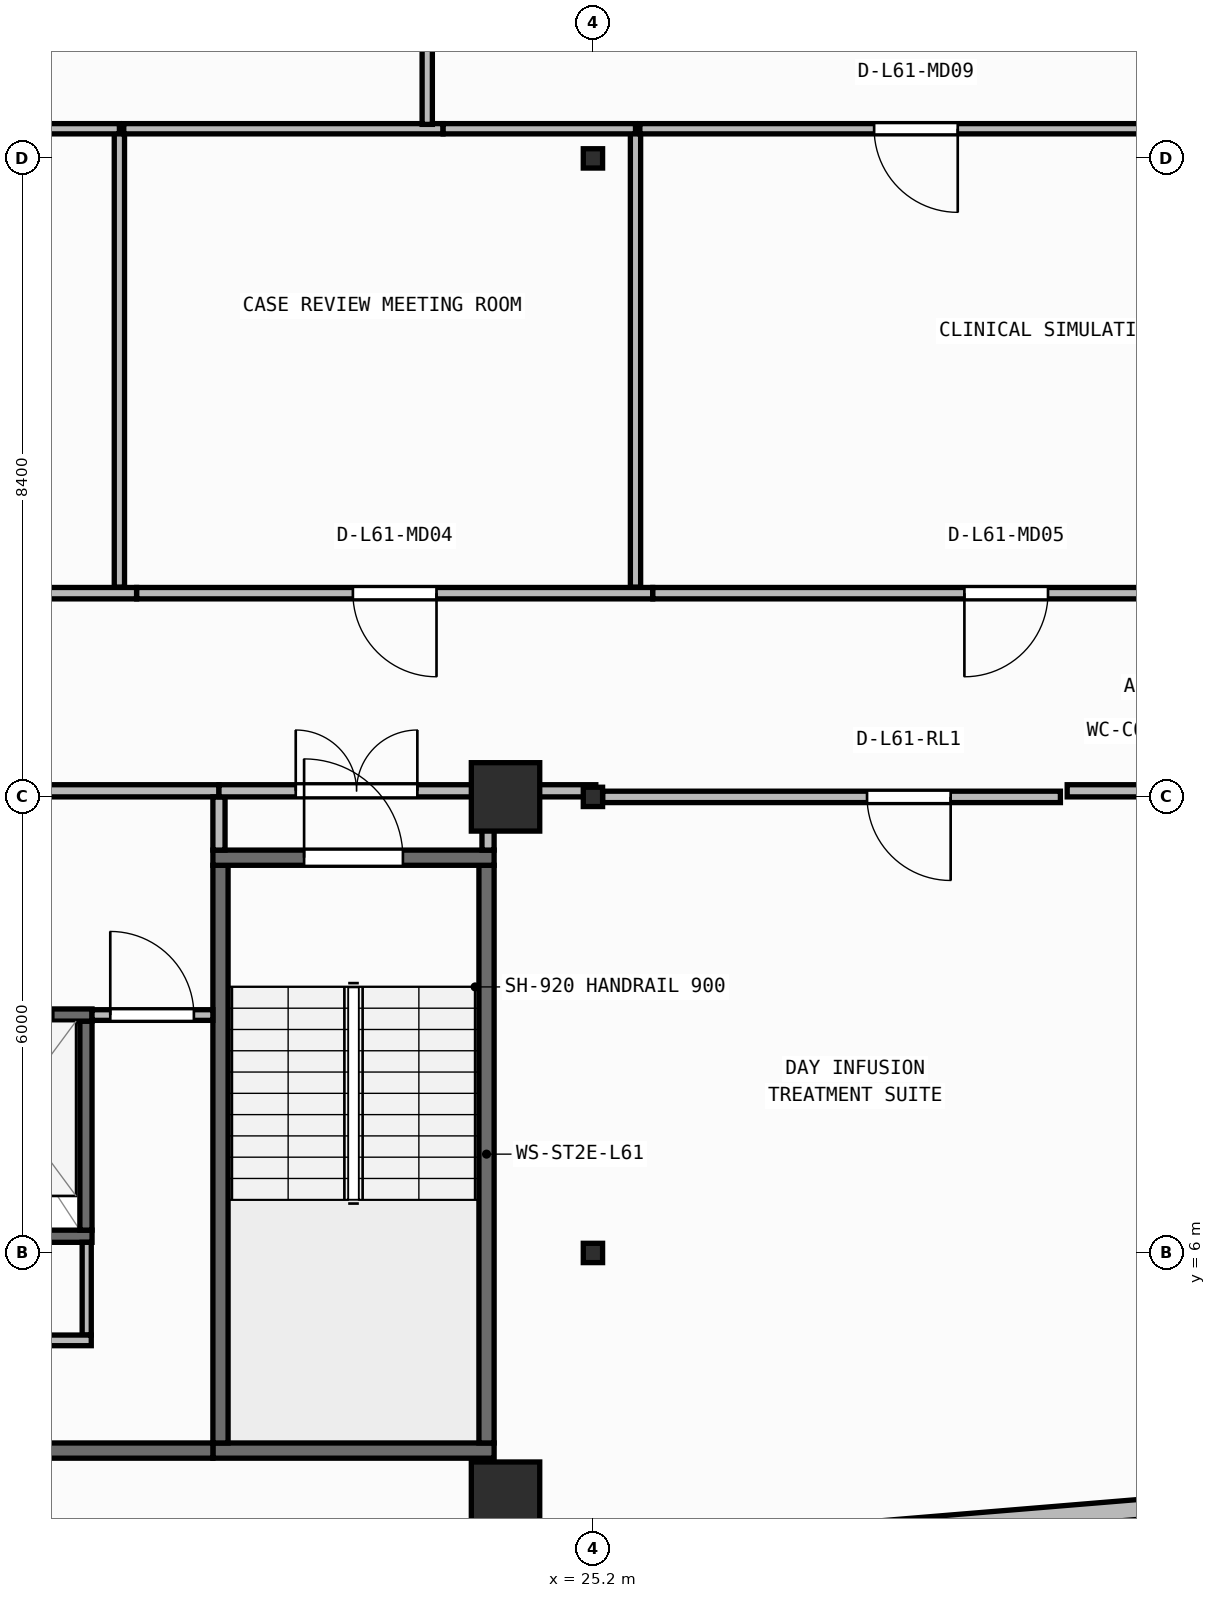
"""IFC4 building model, lengths in metres.
Left out: names, types, materials, properties, quantities, classifications, styles, units other than length and angle.
Written with IfcOpenShell. Run it as: python <this file> out.ifc"""

import sys

from ifc_helpers import new_model, si_unit, direction, frame, frame_2d, origin, origin_2d, place, context, subcontext, project, spatial, rectangle, i_section, extrude, element, fill, save


model = new_model("IFC4")
c1 = context("Model", 3, precision=1e-05, world=origin(), true_north=direction((0.0, 1.0)))
c2 = subcontext(c1, "Body", "Model", "MODEL_VIEW")
j1 = project(units=[si_unit("LENGTHUNIT", "METRE"), si_unit("PLANEANGLEUNIT", "RADIAN")], contexts=[c1])
p1 = place(None, origin())
s1 = spatial("IfcSite", under=j1, at=p1, CompositionType="ELEMENT")
p2 = place(p1, origin())
s2 = spatial("IfcBuilding", under=s1, at=p2, CompositionType="ELEMENT")
p3 = place(p2, frame((0.0, 0.0, 248.65)))
s3 = spatial("IfcBuildingStorey", under=s2, at=p3, CompositionType="ELEMENT", Elevation=248.65)
p4 = place(p3, frame((24.05, 2.8, 0.0), z_axis=(0.0, 0.0, 1.0), x_axis=(1.0, 0.0, 0.0)))
e1 = element("IfcColumn", 1, at=p4, inside=s3, PredefinedType="COLUMN", context=c2, shape_type="SweptSolid", body=[
    extrude(rectangle(XDim=0.9, YDim=0.9, at=origin_2d()), origin(), (0.0, 0.0, 1.0), 3.95),
])
p5 = place(p3, frame((25.2, 6.0, 0.0), z_axis=(0.0, 0.0, 1.0), x_axis=(1.0, 0.0, 0.0)))
e2 = element("IfcColumn", 2, at=p5, inside=s3, PredefinedType="COLUMN", context=c2, shape_type="SweptSolid", body=[
    extrude(i_section(OverallWidth=0.254, OverallDepth=0.254, WebThickness=0.009, FlangeThickness=0.014, FilletRadius=0.013, at=origin_2d()), origin(), (0.0, 0.0, 1.0), 3.95),
])
p6 = place(p3, frame((24.05, 12.0, 0.0), z_axis=(0.0, 0.0, 1.0), x_axis=(1.0, 0.0, 0.0)))
e3 = element("IfcColumn", 3, at=p6, inside=s3, PredefinedType="COLUMN", context=c2, shape_type="SweptSolid", body=[
    extrude(rectangle(XDim=0.9, YDim=0.9, at=origin_2d()), origin(), (0.0, 0.0, 1.0), 3.95),
])
for number, where, z_axis, x_axis in (
    (4, (25.2, 12.0, 0.0), (0.0, 0.0, 1.0), (1.0, 0.0, 0.0)),
    (5, (25.2, 20.4, 0.0), (0.0, 0.0, 1.0), (1.0, 0.0, 0.0)),
):
    element("IfcColumn", number, at=place(p3, frame(where, z_axis=z_axis, x_axis=x_axis)), inside=s3, PredefinedType="COLUMN", context=c2, shape_type="SweptSolid", body=[
        extrude(i_section(OverallWidth=0.254, OverallDepth=0.254, WebThickness=0.009, FlangeThickness=0.014, FilletRadius=0.013, at=origin_2d()), origin(), (0.0, 0.0, 1.0), 3.95),
    ])
p7 = place(p3, frame((2.66, 0.174, 0.0), z_axis=(0.0, 0.0, 1.0), x_axis=(0.996611813627, 0.082248969229, 0.0)))
e6 = element("IfcWall", 6, at=p7, inside=s3, PredefinedType="STANDARD", context=c2, shape_type="SweptSolid", body=[
    extrude(rectangle(XDim=41.019, YDim=0.26, at=frame_2d((20.51, 0.0))), origin(), (0.0, 0.0, 1.0), 3.71),
])
p8 = place(p7, frame((19.31, 0.0, 0.9)))
e7 = element("IfcOpeningElement", 7, at=p8, cuts=e6, PredefinedType="OPENING", context=c2, shape_type="SweptSolid", body=[
    extrude(rectangle(XDim=2.4, YDim=1.65, at=frame_2d((1.2, 0.825))), frame((0.0, 0.14, 0.0), z_axis=(0.0, -1.0, 0.0), x_axis=(1.0, 0.0, 0.0)), (0.0, 0.0, 1.0), 0.28),
])
p9 = place(p3, frame((20.2, 3.4, 0.0), z_axis=(0.0, 0.0, 1.0), x_axis=(1.0, 0.0, 0.0)))
e8 = element("IfcWall", 8, at=p9, inside=s3, PredefinedType="SHEAR", context=c2, shape_type="SweptSolid", body=[
    extrude(rectangle(XDim=3.7, YDim=0.2, at=frame_2d((1.85, 0.0))), origin(), (0.0, 0.0, 1.0), 3.71),
])
for number, where, z_axis, x_axis in (
    (9, (20.3, 3.5, 0.0), (0.0, 0.0, 1.0), (0.0, 1.0, 0.0)),
    (10, (23.8, 3.5, 0.0), (0.0, 0.0, 1.0), (0.0, 1.0, 0.0)),
):
    element("IfcWall", number, at=place(p3, frame(where, z_axis=z_axis, x_axis=x_axis)), inside=s3, PredefinedType="SHEAR", context=c2, shape_type="SweptSolid", body=[
        extrude(rectangle(XDim=7.6, YDim=0.2, at=frame_2d((3.8, 0.0))), origin(), (0.0, 0.0, 1.0), 3.71),
    ])
p10 = place(p3, frame((20.2, 11.2, 0.0), z_axis=(0.0, 0.0, 1.0), x_axis=(1.0, 0.0, 0.0)))
e11 = element("IfcWall", 11, at=p10, inside=s3, PredefinedType="SHEAR", context=c2, shape_type="SweptSolid", body=[
    extrude(rectangle(XDim=3.7, YDim=0.2, at=frame_2d((1.85, 0.0))), origin(), (0.0, 0.0, 1.0), 3.71),
])
p11 = place(p10, frame((1.2, 0.0, 0.0)))
e12 = element("IfcOpeningElement", 12, at=p11, cuts=e11, PredefinedType="OPENING", context=c2, shape_type="SweptSolid", body=[
    extrude(rectangle(XDim=1.3, YDim=2.15, at=frame_2d((0.65, 1.075))), frame((0.0, 0.11, 0.0), z_axis=(0.0, -1.0, 0.0), x_axis=(1.0, 0.0, 0.0)), (0.0, 0.0, 1.0), 0.22),
])
p12 = place(p3, frame((6.5, 3.4, 0.0), z_axis=(0.0, 0.0, 1.0), x_axis=(1.0, 0.0, 0.0)))
e13 = element("IfcWall", 13, at=p12, inside=s3, PredefinedType="SHEAR", context=c2, shape_type="SweptSolid", body=[
    extrude(rectangle(XDim=13.7, YDim=0.2, at=frame_2d((6.85, 0.0))), origin(), (0.0, 0.0, 1.0), 3.71),
])
p13 = place(p3, frame((6.5, 6.22, 0.0), z_axis=(0.0, 0.0, 1.0), x_axis=(1.0, 0.0, 0.0)))
e14 = element("IfcWall", 14, at=p13, inside=s3, PredefinedType="SHEAR", context=c2, shape_type="SweptSolid", body=[
    extrude(rectangle(XDim=12.11, YDim=0.16, at=frame_2d((6.055, 0.0))), origin(), (0.0, 0.0, 1.0), 3.71),
])
p14 = place(p3, frame((18.53, 6.3, 0.0), z_axis=(0.0, 0.0, 1.0), x_axis=(0.0, 1.0, 0.0)))
e15 = element("IfcWall", 15, at=p14, inside=s3, PredefinedType="SHEAR", context=c2, shape_type="SweptSolid", body=[
    extrude(rectangle(XDim=2.75, YDim=0.16, at=frame_2d((1.375, 0.0))), origin(), (0.0, 0.0, 1.0), 3.71),
])
p15 = place(p3, frame((16.575, 9.13, 0.0), z_axis=(0.0, 0.0, 1.0), x_axis=(1.0, 0.0, 0.0)))
e16 = element("IfcWall", 16, at=p15, inside=s3, PredefinedType="SHEAR", context=c2, shape_type="SweptSolid", body=[
    extrude(rectangle(XDim=2.035, YDim=0.16, at=frame_2d((1.018, 0.0))), origin(), (0.0, 0.0, 1.0), 3.71),
])
p16 = place(p15, frame((0.425, 0.0, 0.0)))
e17 = element("IfcOpeningElement", 17, at=p16, cuts=e16, PredefinedType="OPENING", context=c2, shape_type="SweptSolid", body=[
    extrude(rectangle(XDim=1.1, YDim=2.15, at=frame_2d((0.55, 1.075))), frame((0.0, 0.09, 0.0), z_axis=(0.0, -1.0, 0.0), x_axis=(1.0, 0.0, 0.0)), (0.0, 0.0, 1.0), 0.18),
])
p17 = place(p3, frame((18.54, 4.92, 0.0), z_axis=(0.0, 0.0, 1.0), x_axis=(0.0, 1.0, 0.0)))
e18 = element("IfcWall", 18, at=p17, inside=s3, PredefinedType="PARTITIONING", context=c2, shape_type="SweptSolid", body=[
    extrude(rectangle(XDim=1.22, YDim=0.12, at=frame_2d((0.61, 0.0))), origin(), (0.0, 0.0, 1.0), 3.71),
])
p18 = place(p3, frame((6.5, 4.85, 0.0), z_axis=(0.0, 0.0, 1.0), x_axis=(1.0, 0.0, 0.0)))
e19 = element("IfcWall", 19, at=p18, inside=s3, PredefinedType="PARTITIONING", context=c2, shape_type="SweptSolid", body=[
    extrude(rectangle(XDim=12.1, YDim=0.14, at=frame_2d((6.05, 0.0))), origin(), (0.0, 0.0, 1.0), 3.71),
])
p19 = place(p18, frame((5.5, 0.0, 0.0)))
e20 = element("IfcOpeningElement", 20, at=p19, cuts=e19, PredefinedType="OPENING", context=c2, shape_type="SweptSolid", body=[
    extrude(rectangle(XDim=1.1, YDim=2.1, at=frame_2d((0.55, 1.05))), frame((0.0, 0.08, 0.0), z_axis=(0.0, -1.0, 0.0), x_axis=(1.0, 0.0, 0.0)), (0.0, 0.0, 1.0), 0.16),
])
p20 = place(p3, frame((18.61, 9.13, 0.0), z_axis=(0.0, 0.0, 1.0), x_axis=(1.0, 0.0, 0.0)))
e21 = element("IfcWall", 21, at=p20, inside=s3, PredefinedType="PARTITIONING", context=c2, shape_type="SweptSolid", body=[
    extrude(rectangle(XDim=1.59, YDim=0.14, at=frame_2d((0.795, 0.0))), origin(), (0.0, 0.0, 1.0), 3.71),
])
p21 = place(p20, frame((0.24, 0.0, 0.0)))
e22 = element("IfcOpeningElement", 22, at=p21, cuts=e21, PredefinedType="OPENING", context=c2, shape_type="SweptSolid", body=[
    extrude(rectangle(XDim=1.1, YDim=2.1, at=frame_2d((0.55, 1.05))), frame((0.0, 0.08, 0.0), z_axis=(0.0, -1.0, 0.0), x_axis=(1.0, 0.0, 0.0)), (0.0, 0.0, 1.0), 0.16),
])
p22 = place(p3, frame((12.58, 12.08, 0.0), z_axis=(0.0, 0.0, 1.0), x_axis=(1.0, 0.0, 0.0)))
e23 = element("IfcWall", 23, at=p22, inside=s3, PredefinedType="PARTITIONING", context=c2, shape_type="SweptSolid", body=[
    extrude(rectangle(XDim=7.7, YDim=0.16, at=frame_2d((3.85, 0.0))), origin(), (0.0, 0.0, 1.0), 3.157),
])
p23 = place(p22, frame((3.05, 0.0, 0.0)))
e24 = element("IfcOpeningElement", 24, at=p23, cuts=e23, PredefinedType="OPENING", context=c2, shape_type="SweptSolid", body=[
    extrude(rectangle(XDim=1.6, YDim=2.05, at=frame_2d((0.8, 1.025))), frame((0.0, 0.09, 0.0), z_axis=(0.0, -1.0, 0.0), x_axis=(1.0, 0.0, 0.0)), (0.0, 0.0, 1.0), 0.18),
])
p24 = place(p3, frame((20.28, 11.3, 0.0), z_axis=(0.0, 0.0, 1.0), x_axis=(0.0, 1.0, 0.0)))
e25 = element("IfcWall", 25, at=p24, inside=s3, PredefinedType="PARTITIONING", context=c2, shape_type="SweptSolid", body=[
    extrude(rectangle(XDim=0.7, YDim=0.16, at=frame_2d((0.35, 0.0))), origin(), (0.0, 0.0, 1.0), 3.71),
])
p25 = place(p3, frame((20.28, 12.08, 0.0), z_axis=(0.0, 0.0, 1.0), x_axis=(1.0, 0.0, 0.0)))
e26 = element("IfcWall", 26, at=p25, inside=s3, PredefinedType="PARTITIONING", context=c2, shape_type="SweptSolid", body=[
    extrude(rectangle(XDim=3.62, YDim=0.16, at=frame_2d((1.81, 0.0))), origin(), (0.0, 0.0, 1.0), 3.157),
])
p26 = place(p25, frame((1.01, 0.0, 0.0)))
e27 = element("IfcOpeningElement", 27, at=p26, cuts=e26, PredefinedType="OPENING", context=c2, shape_type="SweptSolid", body=[
    extrude(rectangle(XDim=1.6, YDim=2.05, at=frame_2d((0.8, 1.025))), frame((0.0, 0.09, 0.0), z_axis=(0.0, -1.0, 0.0), x_axis=(1.0, 0.0, 0.0)), (0.0, 0.0, 1.0), 0.18),
])
p27 = place(p3, frame((23.82, 11.3, 0.0), z_axis=(0.0, 0.0, 1.0), x_axis=(0.0, 1.0, 0.0)))
e28 = element("IfcWall", 28, at=p27, inside=s3, PredefinedType="PARTITIONING", context=c2, shape_type="SweptSolid", body=[
    extrude(rectangle(XDim=0.7, YDim=0.16, at=frame_2d((0.35, 0.0))), origin(), (0.0, 0.0, 1.0), 3.71),
])
p28 = place(p3, frame((31.35, 12.0, 0.0), z_axis=(0.0, 0.0, 1.0), x_axis=(-1.0, 0.0, 0.0)))
e29 = element("IfcWall", 29, at=p28, inside=s3, PredefinedType="PARTITIONING", context=c2, shape_type="SweptSolid", body=[
    extrude(rectangle(XDim=6.023, YDim=0.15, at=frame_2d((3.012, 0.0))), origin(), (0.0, 0.0, 1.0), 3.157),
])
p29 = place(p28, frame((1.444, 0.0, 0.0)))
e30 = element("IfcOpeningElement", 30, at=p29, cuts=e29, PredefinedType="OPENING", context=c2, shape_type="SweptSolid", body=[
    extrude(rectangle(XDim=1.1, YDim=2.1, at=frame_2d((0.55, 1.05))), frame((0.0, 0.085, 0.0), z_axis=(0.0, -1.0, 0.0), x_axis=(1.0, 0.0, 0.0)), (0.0, 0.0, 1.0), 0.17),
])
p30 = place(p3, frame((19.196, 14.68, 0.0), z_axis=(0.0, 0.0, 1.0), x_axis=(-1.0, 0.0, 0.0)))
e31 = element("IfcWall", 31, at=p30, inside=s3, PredefinedType="PARTITIONING", context=c2, shape_type="SweptSolid", body=[
    extrude(rectangle(XDim=5.642, YDim=0.15, at=frame_2d((2.821, 0.0))), origin(), (0.0, 0.0, 1.0), 3.71),
])
p31 = place(p30, frame((2.271, 0.0, 0.0)))
e32 = element("IfcOpeningElement", 32, at=p31, cuts=e31, PredefinedType="OPENING", context=c2, shape_type="SweptSolid", body=[
    extrude(rectangle(XDim=1.1, YDim=2.1, at=frame_2d((0.55, 1.05))), frame((0.0, 0.085, 0.0), z_axis=(0.0, -1.0, 0.0), x_axis=(1.0, 0.0, 0.0)), (0.0, 0.0, 1.0), 0.17),
])
p32 = place(p3, frame((25.986, 14.68, 0.0), z_axis=(0.0, 0.0, 1.0), x_axis=(-1.0, 0.0, 0.0)))
e33 = element("IfcWall", 33, at=p32, inside=s3, PredefinedType="PARTITIONING", context=c2, shape_type="SweptSolid", body=[
    extrude(rectangle(XDim=6.788, YDim=0.15, at=frame_2d((3.394, 0.0))), origin(), (0.0, 0.0, 1.0), 3.71),
])
p33 = place(p32, frame((2.844, 0.0, 0.0)))
e34 = element("IfcOpeningElement", 34, at=p33, cuts=e33, PredefinedType="OPENING", context=c2, shape_type="SweptSolid", body=[
    extrude(rectangle(XDim=1.1, YDim=2.1, at=frame_2d((0.55, 1.05))), frame((0.0, 0.085, 0.0), z_axis=(0.0, -1.0, 0.0), x_axis=(1.0, 0.0, 0.0)), (0.0, 0.0, 1.0), 0.17),
])
p34 = place(p3, frame((35.286, 14.68, 0.0), z_axis=(0.0, 0.0, 1.0), x_axis=(-1.0, 0.0, 0.0)))
e35 = element("IfcWall", 35, at=p34, inside=s3, PredefinedType="PARTITIONING", context=c2, shape_type="SweptSolid", body=[
    extrude(rectangle(XDim=9.298, YDim=0.15, at=frame_2d((4.649, 0.0))), origin(), (0.0, 0.0, 1.0), 3.71),
])
p35 = place(p34, frame((4.099, 0.0, 0.0)))
e36 = element("IfcOpeningElement", 36, at=p35, cuts=e35, PredefinedType="OPENING", context=c2, shape_type="SweptSolid", body=[
    extrude(rectangle(XDim=1.1, YDim=2.1, at=frame_2d((0.55, 1.05))), frame((0.0, 0.085, 0.0), z_axis=(0.0, -1.0, 0.0), x_axis=(1.0, 0.0, 0.0)), (0.0, 0.0, 1.0), 0.17),
])
p36 = place(p3, frame((18.97, 14.76, 0.0), z_axis=(0.0, 0.0, 1.0), x_axis=(0.0, 1.0, 0.0)))
e37 = element("IfcWall", 37, at=p36, inside=s3, PredefinedType="PARTITIONING", context=c2, shape_type="SweptSolid", body=[
    extrude(rectangle(XDim=6.03, YDim=0.135, at=frame_2d((3.015, 0.0))), origin(), (0.0, 0.0, 1.0), 3.71),
])
p37 = place(p3, frame((18.97, 20.79, 0.0), z_axis=(0.0, 0.0, 1.0), x_axis=(-1.0, 0.0, 0.0)))
e38 = element("IfcWall", 38, at=p37, inside=s3, PredefinedType="PARTITIONING", context=c2, shape_type="SweptSolid", body=[
    extrude(rectangle(XDim=5.19, YDim=0.135, at=frame_2d((2.595, 0.0))), origin(), (0.0, 0.0, 1.0), 3.157),
])
p38 = place(p3, frame((25.76, 14.76, 0.0), z_axis=(0.0, 0.0, 1.0), x_axis=(0.0, 1.0, 0.0)))
e39 = element("IfcWall", 39, at=p38, inside=s3, PredefinedType="PARTITIONING", context=c2, shape_type="SweptSolid", body=[
    extrude(rectangle(XDim=6.03, YDim=0.135, at=frame_2d((3.015, 0.0))), origin(), (0.0, 0.0, 1.0), 3.71),
])
p39 = place(p3, frame((23.228, 20.79, 0.0), z_axis=(0.0, 0.0, 1.0), x_axis=(-1.0, 0.0, 0.0)))
e40 = element("IfcWall", 40, at=p39, inside=s3, PredefinedType="PARTITIONING", context=c2, shape_type="SweptSolid", body=[
    extrude(rectangle(XDim=4.2, YDim=0.135, at=frame_2d((2.1, 0.0))), origin(), (0.0, 0.0, 1.0), 3.157),
])
p40 = place(p3, frame((25.76, 20.79, 0.0), z_axis=(0.0, 0.0, 1.0), x_axis=(-1.0, 0.0, 0.0)))
e41 = element("IfcWall", 41, at=p40, inside=s3, PredefinedType="PARTITIONING", context=c2, shape_type="SweptSolid", body=[
    extrude(rectangle(XDim=2.531, YDim=0.135, at=frame_2d((1.265, 0.0))), origin(), (0.0, 0.0, 1.0), 3.157),
])
p41 = place(p3, frame((35.002, 20.79, 0.0), z_axis=(0.0, 0.0, 1.0), x_axis=(-1.0, 0.0, 0.0)))
e42 = element("IfcWall", 42, at=p41, inside=s3, PredefinedType="PARTITIONING", context=c2, shape_type="SweptSolid", body=[
    extrude(rectangle(XDim=9.185, YDim=0.135, at=frame_2d((4.593, 0.0))), origin(), (0.0, 0.0, 1.0), 3.157),
])
p42 = place(p41, frame((5.003, 0.0, 0.0)))
e43 = element("IfcOpeningElement", 43, at=p42, cuts=e42, PredefinedType="OPENING", context=c2, shape_type="SweptSolid", body=[
    extrude(rectangle(XDim=1.1, YDim=2.1, at=frame_2d((0.55, 1.05))), frame((0.0, 0.077, 0.0), z_axis=(0.0, -1.0, 0.0), x_axis=(1.0, 0.0, 0.0)), (0.0, 0.0, 1.0), 0.155),
])
p43 = place(p3, frame((23.02, 20.847, 0.0), z_axis=(0.0, 0.0, 1.0), x_axis=(0.0, 1.0, 0.0)))
e44 = element("IfcWall", 44, at=p43, inside=s3, PredefinedType="PARTITIONING", context=c2, shape_type="SweptSolid", body=[
    extrude(rectangle(XDim=6.292, YDim=0.135, at=frame_2d((3.146, 0.0))), origin(), (0.0, 0.0, 1.0), 3.71),
])
p44 = place(p3, frame((24.02, 12.08, 0.0), z_axis=(0.0, 0.0, 1.0), x_axis=(1.0, 0.0, 0.0)))
e45 = element("IfcWall", 45, at=p44, inside=s3, PredefinedType="PARTITIONING", context=c2, shape_type="SweptSolid", body=[
    extrude(rectangle(XDim=1.218, YDim=0.16, at=frame_2d((0.609, 0.0))), origin(), (0.0, 0.0, 1.0), 3.157),
])
p45 = place(p3, frame((31.439, 12.08, 0.0), z_axis=(0.0, 0.0, 1.0), x_axis=(1.0, 0.0, 0.0)))
e46 = element("IfcWall", 46, at=p45, inside=s3, PredefinedType="PARTITIONING", context=c2, shape_type="SweptSolid", body=[
    extrude(rectangle(XDim=2.198, YDim=0.16, at=frame_2d((1.099, 0.0))), origin(), (0.0, 0.0, 1.0), 3.157),
])
p46 = place(p11, origin())
e47 = element("IfcDoor", 47, at=p46, inside=s3, OperationType="SINGLE_SWING_LEFT", PredefinedType="DOOR", context=c2, shape_type="SweptSolid", body=[
    extrude(rectangle(XDim=1.3, YDim=2.15, at=frame_2d((0.65, 1.075))), frame((0.0, 0.025, 0.0), z_axis=(0.0, -1.0, 0.0), x_axis=(1.0, 0.0, 0.0)), (0.0, 0.0, 1.0), 0.05),
])
fill(e12, e47)
p47 = place(p16, origin())
e48 = element("IfcDoor", 48, at=p47, inside=s3, OperationType="SLIDING_TO_LEFT", PredefinedType="DOOR", context=c2, shape_type="SweptSolid", body=[
    extrude(rectangle(XDim=1.1, YDim=2.15, at=frame_2d((0.55, 1.075))), frame((0.0, 0.025, 0.0), z_axis=(0.0, -1.0, 0.0), x_axis=(1.0, 0.0, 0.0)), (0.0, 0.0, 1.0), 0.05),
])
fill(e17, e48)
p48 = place(p21, origin())
e49 = element("IfcDoor", 49, at=p48, inside=s3, OperationType="SINGLE_SWING_LEFT", PredefinedType="DOOR", context=c2, shape_type="SweptSolid", body=[
    extrude(rectangle(XDim=1.1, YDim=2.1, at=frame_2d((0.55, 1.05))), frame((0.0, 0.025, 0.0), z_axis=(0.0, -1.0, 0.0), x_axis=(1.0, 0.0, 0.0)), (0.0, 0.0, 1.0), 0.05),
])
fill(e22, e49)
p49 = place(p26, origin())
e50 = element("IfcDoor", 50, at=p49, inside=s3, OperationType="DOUBLE_DOOR_SINGLE_SWING", PredefinedType="DOOR", context=c2, shape_type="SweptSolid", body=[
    extrude(rectangle(XDim=1.6, YDim=2.05, at=frame_2d((0.8, 1.025))), frame((0.0, 0.025, 0.0), z_axis=(0.0, -1.0, 0.0), x_axis=(1.0, 0.0, 0.0)), (0.0, 0.0, 1.0), 0.05),
])
fill(e27, e50)
p50 = place(p29, origin())
e51 = element("IfcDoor", 51, at=p50, inside=s3, OperationType="SINGLE_SWING_LEFT", PredefinedType="DOOR", context=c2, shape_type="SweptSolid", body=[
    extrude(rectangle(XDim=1.1, YDim=2.1, at=frame_2d((0.55, 1.05))), frame((0.0, 0.025, 0.0), z_axis=(0.0, -1.0, 0.0), x_axis=(1.0, 0.0, 0.0)), (0.0, 0.0, 1.0), 0.05),
])
fill(e30, e51)
p51 = place(p33, origin())
e52 = element("IfcDoor", 52, at=p51, inside=s3, OperationType="SINGLE_SWING_LEFT", PredefinedType="DOOR", context=c2, shape_type="SweptSolid", body=[
    extrude(rectangle(XDim=1.1, YDim=2.1, at=frame_2d((0.55, 1.05))), frame((0.0, 0.025, 0.0), z_axis=(0.0, -1.0, 0.0), x_axis=(1.0, 0.0, 0.0)), (0.0, 0.0, 1.0), 0.05),
])
fill(e34, e52)
p52 = place(p35, origin())
e53 = element("IfcDoor", 53, at=p52, inside=s3, OperationType="SINGLE_SWING_RIGHT", PredefinedType="DOOR", context=c2, shape_type="SweptSolid", body=[
    extrude(rectangle(XDim=1.1, YDim=2.1, at=frame_2d((0.55, 1.05))), frame((0.0, 0.025, 0.0), z_axis=(0.0, -1.0, 0.0), x_axis=(1.0, 0.0, 0.0)), (0.0, 0.0, 1.0), 0.05),
])
fill(e36, e53)
p53 = place(p42, origin())
e54 = element("IfcDoor", 54, at=p53, inside=s3, OperationType="SINGLE_SWING_LEFT", PredefinedType="DOOR", context=c2, shape_type="SweptSolid", body=[
    extrude(rectangle(XDim=1.1, YDim=2.1, at=frame_2d((0.55, 1.05))), frame((0.0, 0.025, 0.0), z_axis=(0.0, -1.0, 0.0), x_axis=(1.0, 0.0, 0.0)), (0.0, 0.0, 1.0), 0.05),
])
fill(e43, e54)
save(model, sys.argv[1])
